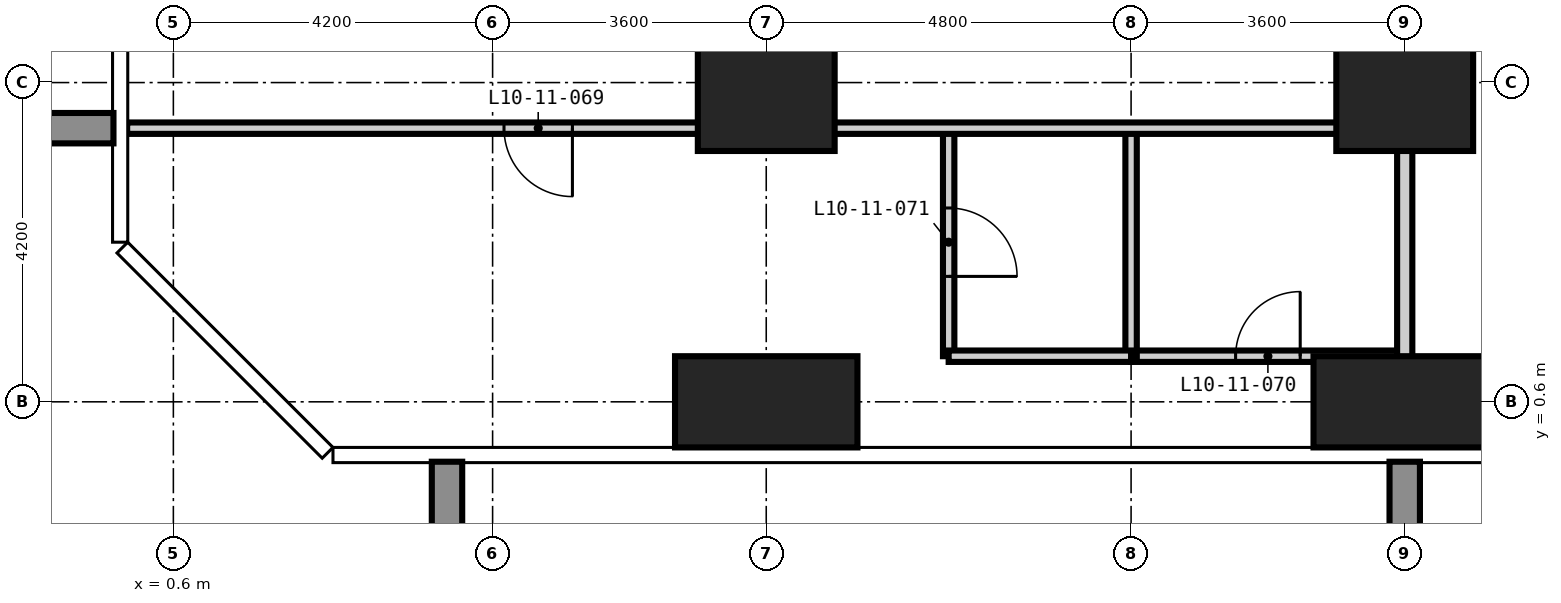
"""IFC4 building model, lengths in metres.
Left out: names, types, materials, properties, quantities, classifications, styles, units other than length and angle.
Written with IfcOpenShell. Run it as: python <this file> out.ifc"""

import sys

from ifc_helpers import new_model, si_unit, direction, frame, frame_2d, origin, origin_2d, place, context, subcontext, project, spatial, rectangle, extrude, element, fill, save


model = new_model("IFC4")
c1 = context("Model", 3, precision=1e-05, world=origin(), true_north=direction((0.0, 1.0)))
c2 = subcontext(c1, "Body", "Model", "MODEL_VIEW")
j1 = project(units=[si_unit("LENGTHUNIT", "METRE"), si_unit("PLANEANGLEUNIT", "RADIAN")], contexts=[c1])
p1 = place(None, origin())
s1 = spatial("IfcSite", under=j1, at=p1, CompositionType="ELEMENT")
p2 = place(p1, origin())
s2 = spatial("IfcBuilding", under=s1, at=p2, CompositionType="ELEMENT")
p3 = place(p2, frame((0.0, 0.0, 45.0)))
s3 = spatial("IfcBuildingStorey", under=s2, at=p3, CompositionType="ELEMENT", Elevation=45.0)
p4 = place(p3, frame((8.4, 0.6, -0.35), z_axis=(0.0, 0.0, 1.0), x_axis=(1.0, 0.0, 0.0)))
e1 = element("IfcColumn", 1, at=p4, inside=s3, PredefinedType="COLUMN", context=c2, shape_type="SweptSolid", body=[
    extrude(rectangle(XDim=2.4, YDim=1.2, at=origin_2d()), origin(), (0.0, 0.0, 1.0), 3.6),
])
p5 = place(p3, frame((8.4, 4.8, -0.35), z_axis=(0.0, 0.0, 1.0), x_axis=(1.0, 0.0, 0.0)))
e2 = element("IfcColumn", 2, at=p5, inside=s3, PredefinedType="COLUMN", context=c2, shape_type="SweptSolid", body=[
    extrude(rectangle(XDim=1.8, YDim=1.8, at=origin_2d()), origin(), (0.0, 0.0, 1.0), 3.6),
])
p6 = place(p3, frame((16.8, 0.6, -0.35), z_axis=(0.0, 0.0, 1.0), x_axis=(1.0, 0.0, 0.0)))
e3 = element("IfcColumn", 3, at=p6, inside=s3, PredefinedType="COLUMN", context=c2, shape_type="SweptSolid", body=[
    extrude(rectangle(XDim=2.4, YDim=1.2, at=origin_2d()), origin(), (0.0, 0.0, 1.0), 3.6),
])
p7 = place(p3, frame((16.8, 4.8, -0.35), z_axis=(0.0, 0.0, 1.0), x_axis=(1.0, 0.0, 0.0)))
e4 = element("IfcColumn", 4, at=p7, inside=s3, PredefinedType="COLUMN", context=c2, shape_type="SweptSolid", body=[
    extrude(rectangle(XDim=1.8, YDim=1.8, at=origin_2d()), origin(), (0.0, 0.0, 1.0), 3.6),
])
p8 = place(p3, frame((13.2, 1.2, 0.0), z_axis=(0.0, 0.0, 1.0), x_axis=(1.0, 0.0, 0.0)))
e5 = element("IfcWall", 5, at=p8, inside=s3, PredefinedType="PARTITIONING", context=c2, shape_type="SweptSolid", body=[
    extrude(rectangle(XDim=3.6, YDim=0.15, at=frame_2d((1.8, 0.0))), origin(), (0.0, 0.0, 1.0), 3.25),
])
p9 = place(p8, frame((1.375, 0.0, 0.0)))
e6 = element("IfcOpeningElement", 6, at=p9, cuts=e5, PredefinedType="OPENING", context=c2, shape_type="SweptSolid", body=[
    extrude(rectangle(XDim=0.85, YDim=2.1, at=frame_2d((0.425, 1.05))), frame((0.0, 0.085, 0.0), z_axis=(0.0, -1.0, 0.0), x_axis=(1.0, 0.0, 0.0)), (0.0, 0.0, 1.0), 0.17),
])
p10 = place(p3, frame((16.8, -0.008, 0.0), z_axis=(0.0, 0.0, 1.0), x_axis=(0.0, 1.0, 0.0)))
e7 = element("IfcWall", 7, at=p10, inside=s3, PredefinedType="PARTITIONING", context=c2, shape_type="SweptSolid", body=[
    extrude(rectangle(XDim=12.958, YDim=0.2, at=frame_2d((6.479, 0.0))), origin(), (0.0, 0.0, 1.0), 3.25),
])
p11 = place(p3, frame((10.8, 1.2, 0.0), z_axis=(0.0, 0.0, 1.0), x_axis=(0.0, 1.0, 0.0)))
e8 = element("IfcWall", 8, at=p11, inside=s3, PredefinedType="PARTITIONING", context=c2, shape_type="SweptSolid", body=[
    extrude(rectangle(XDim=3.0, YDim=0.15, at=frame_2d((1.5, 0.0))), origin(), (0.0, 0.0, 1.0), 3.25),
])
p12 = place(p11, frame((1.05, 0.0, 0.0)))
e9 = element("IfcOpeningElement", 9, at=p12, cuts=e8, PredefinedType="OPENING", context=c2, shape_type="SweptSolid", body=[
    extrude(rectangle(XDim=0.9, YDim=2.1, at=frame_2d((0.45, 1.05))), frame((0.0, 0.085, 0.0), z_axis=(0.0, -1.0, 0.0), x_axis=(1.0, 0.0, 0.0)), (0.0, 0.0, 1.0), 0.17),
])
p13 = place(p3, frame((13.2, 1.2, 0.0), z_axis=(0.0, 0.0, 1.0), x_axis=(0.0, 1.0, 0.0)))
e10 = element("IfcWall", 10, at=p13, inside=s3, PredefinedType="PARTITIONING", context=c2, shape_type="SweptSolid", body=[
    extrude(rectangle(XDim=3.0, YDim=0.15, at=frame_2d((1.5, 0.0))), origin(), (0.0, 0.0, 1.0), 3.25),
])
p14 = place(p3, frame((10.8, 1.2, 0.0), z_axis=(0.0, 0.0, 1.0), x_axis=(1.0, 0.0, 0.0)))
e11 = element("IfcWall", 11, at=p14, inside=s3, PredefinedType="PARTITIONING", context=c2, shape_type="SweptSolid", body=[
    extrude(rectangle(XDim=2.4, YDim=0.15, at=frame_2d((1.2, 0.0))), origin(), (0.0, 0.0, 1.0), 3.25),
])
p15 = place(p3, frame((-0.008, 4.2, 0.0), z_axis=(0.0, 0.0, 1.0), x_axis=(1.0, 0.0, 0.0)))
e12 = element("IfcWall", 12, at=p15, inside=s3, PredefinedType="PARTITIONING", context=c2, shape_type="SweptSolid", body=[
    extrude(rectangle(XDim=16.808, YDim=0.15, at=frame_2d((8.404, 0.0))), origin(), (0.0, 0.0, 1.0), 3.25),
])
p16 = place(p15, frame((4.958, 0.0, 0.0)))
e13 = element("IfcOpeningElement", 13, at=p16, cuts=e12, PredefinedType="OPENING", context=c2, shape_type="SweptSolid", body=[
    extrude(rectangle(XDim=0.9, YDim=2.1, at=frame_2d((0.45, 1.05))), frame((0.0, 0.085, 0.0), z_axis=(0.0, -1.0, 0.0), x_axis=(1.0, 0.0, 0.0)), (0.0, 0.0, 1.0), 0.17),
])
p17 = place(p16, frame((0.9, 0.0, 0.0), z_axis=(0.0, 0.0, 1.0), x_axis=(-1.0, 0.0, 0.0)))
e14 = element("IfcDoor", 14, at=p17, inside=s3, OperationType="SINGLE_SWING_LEFT", PredefinedType="DOOR", context=c2, shape_type="SweptSolid", body=[
    extrude(rectangle(XDim=0.9, YDim=2.1, at=frame_2d((0.45, 1.05))), frame((0.0, 0.025, 0.0), z_axis=(0.0, -1.0, 0.0), x_axis=(1.0, 0.0, 0.0)), (0.0, 0.0, 1.0), 0.05),
])
fill(e13, e14)
p18 = place(p9, origin())
e15 = element("IfcDoor", 15, at=p18, inside=s3, OperationType="SINGLE_SWING_RIGHT", PredefinedType="DOOR", context=c2, shape_type="SweptSolid", body=[
    extrude(rectangle(XDim=0.85, YDim=2.1, at=frame_2d((0.425, 1.05))), frame((0.0, 0.025, 0.0), z_axis=(0.0, -1.0, 0.0), x_axis=(1.0, 0.0, 0.0)), (0.0, 0.0, 1.0), 0.05),
])
fill(e6, e15)
p19 = place(p12, frame((0.9, 0.0, 0.0), z_axis=(0.0, 0.0, 1.0), x_axis=(-1.0, 0.0, 0.0)))
e16 = element("IfcDoor", 16, at=p19, inside=s3, OperationType="SINGLE_SWING_RIGHT", PredefinedType="DOOR", context=c2, shape_type="SweptSolid", body=[
    extrude(rectangle(XDim=0.9, YDim=2.1, at=frame_2d((0.45, 1.05))), frame((0.0, 0.025, 0.0), z_axis=(0.0, -1.0, 0.0), x_axis=(1.0, 0.0, 0.0)), (0.0, 0.0, 1.0), 0.05),
])
fill(e9, e16)
save(model, sys.argv[1])
